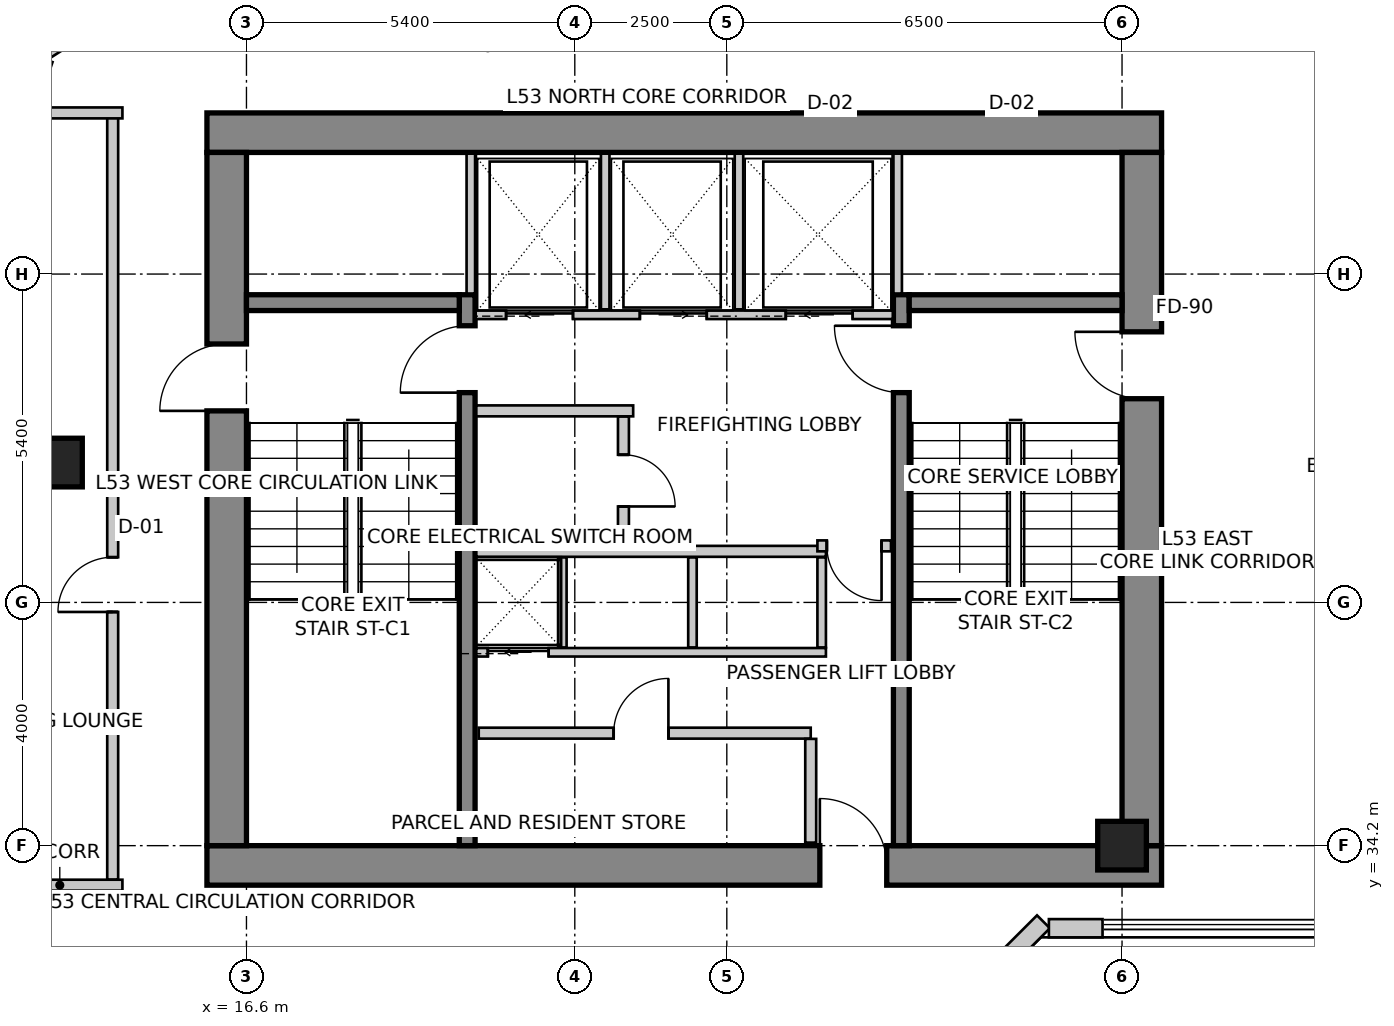
"""IFC4 building model, lengths in metres.
Left out: names, types, materials, properties, quantities, classifications, styles, units other than length and angle.
Written with IfcOpenShell. Run it as: python <this file> out.ifc"""

import sys

from ifc_helpers import new_model, si_unit, direction, frame, frame_2d, origin, origin_2d, place, context, subcontext, project, spatial, rectangle, extrude, source, transform, mapped, element, fill, save


model = new_model("IFC4")
c1 = context("Model", 3, precision=1e-05, world=origin(), true_north=direction((0.0, 1.0)))
c2 = subcontext(c1, "Body", "Model", "MODEL_VIEW")
j1 = project(units=[si_unit("LENGTHUNIT", "METRE"), si_unit("PLANEANGLEUNIT", "RADIAN")], contexts=[c1])
p1 = place(None, origin())
s1 = spatial("IfcSite", under=j1, at=p1, CompositionType="ELEMENT")
p2 = place(p1, origin())
s2 = spatial("IfcBuilding", under=s1, at=p2, CompositionType="ELEMENT")
p3 = place(p2, frame((0.0, 0.0, 211.4)))
s3 = spatial("IfcBuildingStorey", under=s2, at=p3, CompositionType="ELEMENT", Elevation=211.4)
p4 = place(p3, frame((15.95, 45.925, 0.0), z_axis=(0.0, 0.0, 1.0), x_axis=(1.0, 0.0, 0.0)))
e1 = element("IfcWall", 1, at=p4, inside=s3, PredefinedType="SHEAR", context=c2, shape_type="SweptSolid", body=[
    extrude(rectangle(XDim=15.7, YDim=0.65, at=frame_2d((7.85, 0.0))), origin(), (0.0, 0.0, 1.0), 3.5),
])
p5 = place(p3, frame((15.95, 33.875, 0.0), z_axis=(0.0, 0.0, 1.0), x_axis=(1.0, 0.0, 0.0)))
e2 = element("IfcWall", 2, at=p5, inside=s3, PredefinedType="SHEAR", context=c2, shape_type="SweptSolid", body=[
    extrude(rectangle(XDim=15.7, YDim=0.65, at=frame_2d((7.85, 0.0))), origin(), (0.0, 0.0, 1.0), 3.5),
])
m1 = source(origin(), c2, "Body", "SweptSolid", [
    extrude(rectangle(XDim=1.1, YDim=2.15, at=frame_2d((0.55, 1.075))), frame((0.0, 0.335, 0.0), z_axis=(0.0, -1.0, 0.0), x_axis=(1.0, 0.0, 0.0)), (0.0, 0.0, 1.0), 0.67),
])
p6 = place(p5, frame((10.08, 0.0, 0.0)))
e3 = element("IfcOpeningElement", 3, at=p6, cuts=e2, PredefinedType="OPENING", context=c2, shape_type="MappedRepresentation", body=[
    mapped(m1, transform((0.0, 0.0, 0.0), scale=1.0)),
])
p7 = place(p3, frame((16.275, 34.2, 0.0), z_axis=(0.0, 0.0, 1.0), x_axis=(0.0, 1.0, 0.0)))
e4 = element("IfcWall", 4, at=p7, inside=s3, PredefinedType="SHEAR", context=c2, shape_type="SweptSolid", body=[
    extrude(rectangle(XDim=11.4, YDim=0.65, at=frame_2d((5.7, 0.0))), origin(), (0.0, 0.0, 1.0), 3.5),
])
p8 = place(p7, frame((7.15, 0.0, 0.0)))
e5 = element("IfcOpeningElement", 5, at=p8, cuts=e4, PredefinedType="OPENING", context=c2, shape_type="MappedRepresentation", body=[
    mapped(m1, transform((0.0, 0.0, 0.0), scale=1.0)),
])
p9 = place(p3, frame((31.325, 34.2, 0.0), z_axis=(0.0, 0.0, 1.0), x_axis=(0.0, 1.0, 0.0)))
e6 = element("IfcWall", 6, at=p9, inside=s3, PredefinedType="SHEAR", context=c2, shape_type="SweptSolid", body=[
    extrude(rectangle(XDim=11.4, YDim=0.65, at=frame_2d((5.7, 0.0))), origin(), (0.0, 0.0, 1.0), 3.5),
])
p10 = place(p9, frame((7.35, 0.0, 0.0)))
e7 = element("IfcOpeningElement", 7, at=p10, cuts=e6, PredefinedType="OPENING", context=c2, shape_type="MappedRepresentation", body=[
    mapped(m1, transform((0.0, 0.0, 0.0), scale=1.0)),
])
p11 = place(p3, frame((20.23, 34.2, 0.0), z_axis=(0.0, 0.0, 1.0), x_axis=(0.0, 1.0, 0.0)))
e8 = element("IfcWall", 8, at=p11, inside=s3, PredefinedType="SHEAR", context=c2, shape_type="SweptSolid", body=[
    extrude(rectangle(XDim=9.06, YDim=0.26, at=frame_2d((4.53, 0.0))), origin(), (0.0, 0.0, 1.0), 3.5),
])
m2 = source(origin(), c2, "Body", "SweptSolid", [
    extrude(rectangle(XDim=1.1, YDim=2.15, at=frame_2d((0.55, 1.075))), frame((0.0, 0.14, 0.0), z_axis=(0.0, -1.0, 0.0), x_axis=(1.0, 0.0, 0.0)), (0.0, 0.0, 1.0), 0.28),
])
p12 = place(p11, frame((7.45, 0.0, 0.0)))
e9 = element("IfcOpeningElement", 9, at=p12, cuts=e8, PredefinedType="OPENING", context=c2, shape_type="MappedRepresentation", body=[
    mapped(m2, transform((0.0, 0.0, 0.0), scale=1.0)),
])
p13 = place(p3, frame((27.37, 34.2, 0.0), z_axis=(0.0, 0.0, 1.0), x_axis=(0.0, 1.0, 0.0)))
e10 = element("IfcWall", 10, at=p13, inside=s3, PredefinedType="SHEAR", context=c2, shape_type="SweptSolid", body=[
    extrude(rectangle(XDim=9.06, YDim=0.26, at=frame_2d((4.53, 0.0))), origin(), (0.0, 0.0, 1.0), 3.5),
])
p14 = place(p13, frame((7.45, 0.0, 0.0)))
e11 = element("IfcOpeningElement", 11, at=p14, cuts=e10, PredefinedType="OPENING", context=c2, shape_type="MappedRepresentation", body=[
    mapped(m2, transform((0.0, 0.0, 0.0), scale=1.0)),
])
for number, where, z_axis, x_axis in (
    (12, (16.6, 43.13, 0.0), (0.0, 0.0, 1.0), (1.0, 0.0, 0.0)),
    (13, (27.5, 43.13, 0.0), (0.0, 0.0, 1.0), (1.0, 0.0, 0.0)),
):
    element("IfcWall", number, at=place(p3, frame(where, z_axis=z_axis, x_axis=x_axis)), inside=s3, PredefinedType="SHEAR", context=c2, shape_type="SweptSolid", body=[
        extrude(rectangle(XDim=3.5, YDim=0.26, at=frame_2d((1.75, 0.0))), origin(), (0.0, 0.0, 1.0), 3.5),
    ])
m3 = source(origin(), c2, "Body", "SweptSolid", [
    extrude(rectangle(XDim=0.8, YDim=0.8, at=origin_2d()), origin(), (0.0, 0.0, 1.0), 3.5),
])
for number, where, z_axis, x_axis in (
    (14, (13.5, 40.5, 0.0), (0.0, 0.0, 1.0), (1.0, 0.0, 0.0)),
    (15, (31.0, 34.2, 0.0), (0.0, 0.0, 1.0), (1.0, 0.0, 0.0)),
):
    element("IfcColumn", number, at=place(p3, frame(where, z_axis=z_axis, x_axis=x_axis)), inside=s3, PredefinedType="COLUMN", context=c2, shape_type="MappedRepresentation", body=[
        mapped(m3, transform((0.0, 0.0, 0.0), scale=1.0)),
    ])
p15 = place(p3, frame((27.652, 30.892, 0.0), z_axis=(0.0, 0.0, 1.0), x_axis=(0.707106781187, 0.707106781187, 0.0)))
e16 = element("IfcWall", 16, at=p15, inside=s3, PredefinedType="SOLIDWALL", context=c2, shape_type="SweptSolid", body=[
    extrude(rectangle(XDim=2.907, YDim=0.3, at=frame_2d((1.454, 0.0))), origin(), (0.0, 0.0, 1.0), 3.25),
])
p16 = place(p3, frame((29.797, 32.842, 0.0), z_axis=(0.0, 0.0, 1.0), x_axis=(1.0, 0.0, 0.0)))
e17 = element("IfcWall", 17, at=p16, inside=s3, PredefinedType="SOLIDWALL", context=c2, shape_type="SweptSolid", body=[
    extrude(rectangle(XDim=0.882, YDim=0.3, at=frame_2d((0.441, 0.0))), origin(), (0.0, 0.0, 1.0), 3.25),
])
p17 = place(p3, frame((21.874, 52.742, 0.0), z_axis=(0.0, 0.0, 1.0), x_axis=(-0.84365659959, -0.536883173482, 0.0)))
e18 = element("IfcWall", 18, at=p17, inside=s3, PredefinedType="SOLIDWALL", context=c2, shape_type="SweptSolid", body=[
    extrude(rectangle(XDim=10.283, YDim=0.3, at=frame_2d((5.142, 0.0))), origin(), (0.0, 0.0, 1.0), 3.25),
])
m4 = source(origin(), c2, "Body", "SweptSolid", [
    extrude(rectangle(XDim=2.4, YDim=2.2, at=frame_2d((1.2, 1.1))), frame((0.0, 0.16, 0.0), z_axis=(0.0, -1.0, 0.0), x_axis=(1.0, 0.0, 0.0)), (0.0, 0.0, 1.0), 0.32),
])
p18 = place(p17, frame((3.307, 0.0, 0.85)))
e19 = element("IfcOpeningElement", 19, at=p18, cuts=e18, PredefinedType="OPENING", context=c2, shape_type="MappedRepresentation", body=[
    mapped(m4, transform((0.0, 0.0, 0.0), scale=1.0)),
])
p19 = place(p3, frame((13.269, 47.134, 0.0), z_axis=(0.0, 0.0, 1.0), x_axis=(-0.319920776449, -0.947444297464, 0.0)))
e20 = element("IfcWall", 20, at=p19, inside=s3, PredefinedType="SOLIDWALL", context=c2, shape_type="SweptSolid", body=[
    extrude(rectangle(XDim=16.133, YDim=0.3, at=frame_2d((8.067, 0.0))), origin(), (0.0, 0.0, 1.0), 3.25),
])
m5 = source(origin(), c2, "Body", "SweptSolid", [
    extrude(rectangle(XDim=2.1, YDim=2.0, at=frame_2d((1.05, 1.0))), frame((0.0, 0.16, 0.0), z_axis=(0.0, -1.0, 0.0), x_axis=(1.0, 0.0, 0.0)), (0.0, 0.0, 1.0), 0.32),
])
p20 = place(p19, frame((2.513, 0.0, 0.85)))
e21 = element("IfcOpeningElement", 21, at=p20, cuts=e20, PredefinedType="OPENING", context=c2, shape_type="MappedRepresentation", body=[
    mapped(m5, transform((0.0, 0.0, 0.0), scale=1.0)),
])
p21 = place(p19, frame((7.26, 0.0, 0.85)))
e22 = element("IfcOpeningElement", 22, at=p21, cuts=e20, PredefinedType="OPENING", context=c2, shape_type="MappedRepresentation", body=[
    mapped(m4, transform((0.0, 0.0, 0.0), scale=1.0)),
])
p22 = place(p19, frame((12.307, 0.0, 0.85)))
e23 = element("IfcOpeningElement", 23, at=p22, cuts=e20, PredefinedType="OPENING", context=c2, shape_type="MappedRepresentation", body=[
    mapped(m5, transform((0.0, 0.0, 0.0), scale=1.0)),
])
p23 = place(p3, frame((20.37, 42.93, 0.0), z_axis=(0.0, 0.0, 1.0), x_axis=(1.0, 0.0, 0.0)))
e24 = element("IfcWall", 24, at=p23, inside=s3, PredefinedType="SOLIDWALL", context=c2, shape_type="SweptSolid", body=[
    extrude(rectangle(XDim=6.86, YDim=0.14, at=frame_2d((3.43, 0.0))), origin(), (0.0, 0.0, 1.0), 3.25),
])
m6 = source(origin(), c2, "Body", "SweptSolid", [
    extrude(rectangle(XDim=1.1, YDim=2.15, at=frame_2d((0.55, 1.075))), frame((0.0, 0.08, 0.0), z_axis=(0.0, -1.0, 0.0), x_axis=(1.0, 0.0, 0.0)), (0.0, 0.0, 1.0), 0.16),
])
p24 = place(p23, frame((0.5, 0.0, 0.0)))
e25 = element("IfcOpeningElement", 25, at=p24, cuts=e24, PredefinedType="OPENING", context=c2, shape_type="MappedRepresentation", body=[
    mapped(m6, transform((0.0, 0.0, 0.0), scale=1.0)),
])
p25 = place(p23, frame((2.7, 0.0, 0.0)))
e26 = element("IfcOpeningElement", 26, at=p25, cuts=e24, PredefinedType="OPENING", context=c2, shape_type="MappedRepresentation", body=[
    mapped(m6, transform((0.0, 0.0, 0.0), scale=1.0)),
])
p26 = place(p23, frame((5.1, 0.0, 0.0)))
e27 = element("IfcOpeningElement", 27, at=p26, cuts=e24, PredefinedType="OPENING", context=c2, shape_type="MappedRepresentation", body=[
    mapped(m6, transform((0.0, 0.0, 0.0), scale=1.0)),
])
for number, where, z_axis, x_axis in (
    (28, (20.29, 43.28, 0.0), (0.0, 0.0, 1.0), (0.0, 1.0, 0.0)),
    (29, (27.31, 43.28, 0.0), (0.0, 0.0, 1.0), (0.0, 1.0, 0.0)),
):
    element("IfcWall", number, at=place(p3, frame(where, z_axis=z_axis, x_axis=x_axis)), inside=s3, PredefinedType="SOLIDWALL", context=c2, shape_type="SweptSolid", body=[
        extrude(rectangle(XDim=2.3, YDim=0.14, at=frame_2d((1.15, 0.0))), origin(), (0.0, 0.0, 1.0), 3.25),
    ])
for number, where, z_axis, x_axis in (
    (30, (22.5, 43.02, 0.0), (0.0, 0.0, 1.0), (0.0, 1.0, 0.0)),
    (31, (24.7, 43.02, 0.0), (0.0, 0.0, 1.0), (0.0, 1.0, 0.0)),
):
    element("IfcWall", number, at=place(p3, frame(where, z_axis=z_axis, x_axis=x_axis)), inside=s3, PredefinedType="SOLIDWALL", context=c2, shape_type="SweptSolid", body=[
        extrude(rectangle(XDim=2.56, YDim=0.14, at=frame_2d((1.28, 0.0))), origin(), (0.0, 0.0, 1.0), 3.25),
    ])
p27 = place(p3, frame((20.38, 37.38, 0.0), z_axis=(0.0, 0.0, 1.0), x_axis=(1.0, 0.0, 0.0)))
e32 = element("IfcWall", 32, at=p27, inside=s3, PredefinedType="SOLIDWALL", context=c2, shape_type="SweptSolid", body=[
    extrude(rectangle(XDim=5.75, YDim=0.14, at=frame_2d((2.875, 0.0))), origin(), (0.0, 0.0, 1.0), 3.25),
])
m7 = source(origin(), c2, "Body", "SweptSolid", [
    extrude(rectangle(XDim=1.0, YDim=2.15, at=frame_2d((0.5, 1.075))), frame((0.0, 0.08, 0.0), z_axis=(0.0, -1.0, 0.0), x_axis=(1.0, 0.0, 0.0)), (0.0, 0.0, 1.0), 0.16),
])
p28 = place(p27, frame((0.19, 0.0, 0.0)))
e33 = element("IfcOpeningElement", 33, at=p28, cuts=e32, PredefinedType="OPENING", context=c2, shape_type="MappedRepresentation", body=[
    mapped(m7, transform((0.0, 0.0, 0.0), scale=1.0)),
])
p29 = place(p3, frame((20.38, 39.04, 0.0), z_axis=(0.0, 0.0, 1.0), x_axis=(1.0, 0.0, 0.0)))
e34 = element("IfcWall", 34, at=p29, inside=s3, PredefinedType="SOLIDWALL", context=c2, shape_type="SweptSolid", body=[
    extrude(rectangle(XDim=5.75, YDim=0.18, at=frame_2d((2.875, 0.0))), origin(), (0.0, 0.0, 1.0), 3.25),
])
for number, where, z_axis, x_axis in (
    (35, (26.06, 37.46, 0.0), (0.0, 0.0, 1.0), (0.0, 1.0, 0.0)),
    (36, (21.795, 37.46, 0.0), (0.0, 0.0, 1.0), (0.0, 1.0, 0.0)),
    (37, (23.935, 37.46, 0.0), (0.0, 0.0, 1.0), (0.0, 1.0, 0.0)),
):
    element("IfcWall", number, at=place(p3, frame(where, z_axis=z_axis, x_axis=x_axis)), inside=s3, PredefinedType="SOLIDWALL", context=c2, shape_type="SweptSolid", body=[
        extrude(rectangle(XDim=1.48, YDim=0.14, at=frame_2d((0.74, 0.0))), origin(), (0.0, 0.0, 1.0), 3.25),
    ])
p30 = place(p3, frame((22.96, 41.35, 0.0), z_axis=(0.0, 0.0, 1.0), x_axis=(-1.0, 0.0, 0.0)))
e38 = element("IfcWall", 38, at=p30, inside=s3, PredefinedType="PARTITIONING", context=c2, shape_type="SweptSolid", body=[
    extrude(rectangle(XDim=2.58, YDim=0.18, at=frame_2d((1.29, 0.0))), origin(), (0.0, 0.0, 1.0), 3.25),
])
p31 = place(p3, frame((22.8, 41.256, 0.0), z_axis=(0.0, 0.0, 1.0), x_axis=(0.0, -1.0, 0.0)))
e39 = element("IfcWall", 39, at=p31, inside=s3, PredefinedType="PARTITIONING", context=c2, shape_type="SweptSolid", body=[
    extrude(rectangle(XDim=2.106, YDim=0.18, at=frame_2d((1.053, 0.0))), origin(), (0.0, 0.0, 1.0), 3.25),
])
m8 = source(origin(), c2, "Body", "SweptSolid", [
    extrude(rectangle(XDim=0.85, YDim=2.15, at=frame_2d((0.425, 1.075))), frame((0.0, 0.1, 0.0), z_axis=(0.0, -1.0, 0.0), x_axis=(1.0, 0.0, 0.0)), (0.0, 0.0, 1.0), 0.2),
])
p32 = place(p31, frame((0.628, 0.0, 0.0)))
e40 = element("IfcOpeningElement", 40, at=p32, cuts=e39, PredefinedType="OPENING", context=c2, shape_type="MappedRepresentation", body=[
    mapped(m8, transform((0.0, 0.0, 0.0), scale=1.0)),
])
p33 = place(p3, frame((27.2, 39.13, 0.0), z_axis=(0.0, 0.0, 1.0), x_axis=(-1.0, 0.0, 0.0)))
e41 = element("IfcWall", 41, at=p33, inside=s3, PredefinedType="PARTITIONING", context=c2, shape_type="SweptSolid", body=[
    extrude(rectangle(XDim=1.21, YDim=0.18, at=frame_2d((0.605, 0.0))), origin(), (0.0, 0.0, 1.0), 3.25),
])
m9 = source(origin(), c2, "Body", "SweptSolid", [
    extrude(rectangle(XDim=0.9, YDim=2.15, at=frame_2d((0.45, 1.075))), frame((0.0, 0.1, 0.0), z_axis=(0.0, -1.0, 0.0), x_axis=(1.0, 0.0, 0.0)), (0.0, 0.0, 1.0), 0.2),
])
p34 = place(p33, frame((0.155, 0.0, 0.0)))
e42 = element("IfcOpeningElement", 42, at=p34, cuts=e41, PredefinedType="OPENING", context=c2, shape_type="MappedRepresentation", body=[
    mapped(m9, transform((0.0, 0.0, 0.0), scale=1.0)),
])
p35 = place(p3, frame((20.42, 36.05, 0.0), z_axis=(0.0, 0.0, 1.0), x_axis=(1.0, 0.0, 0.0)))
e43 = element("IfcWall", 43, at=p35, inside=s3, PredefinedType="PARTITIONING", context=c2, shape_type="SweptSolid", body=[
    extrude(rectangle(XDim=5.46, YDim=0.18, at=frame_2d((2.73, 0.0))), origin(), (0.0, 0.0, 1.0), 3.25),
])
p36 = place(p35, frame((2.219, 0.0, 0.0)))
e44 = element("IfcOpeningElement", 44, at=p36, cuts=e43, PredefinedType="OPENING", context=c2, shape_type="MappedRepresentation", body=[
    mapped(m9, transform((0.0, 0.0, 0.0), scale=1.0)),
])
p37 = place(p3, frame((25.88, 35.956, 0.0), z_axis=(0.0, 0.0, 1.0), x_axis=(0.0, -1.0, 0.0)))
e45 = element("IfcWall", 45, at=p37, inside=s3, PredefinedType="PARTITIONING", context=c2, shape_type="SweptSolid", body=[
    extrude(rectangle(XDim=1.706, YDim=0.18, at=frame_2d((0.853, 0.0))), origin(), (0.0, 0.0, 1.0), 2.542),
])
p38 = place(p3, frame((12.5, 33.55, 0.0), z_axis=(0.0, 0.0, 1.0), x_axis=(1.0, 0.0, 0.0)))
e46 = element("IfcWall", 46, at=p38, inside=s3, PredefinedType="PARTITIONING", context=c2, shape_type="SweptSolid", body=[
    extrude(rectangle(XDim=2.06, YDim=0.18, at=frame_2d((1.03, 0.0))), origin(), (0.0, 0.0, 1.0), 3.25),
])
p39 = place(p3, frame((14.4, 33.644, 0.0), z_axis=(0.0, 0.0, 1.0), x_axis=(0.0, 1.0, 0.0)))
e47 = element("IfcWall", 47, at=p39, inside=s3, PredefinedType="PARTITIONING", context=c2, shape_type="SweptSolid", body=[
    extrude(rectangle(XDim=12.606, YDim=0.18, at=frame_2d((6.303, 0.0))), origin(), (0.0, 0.0, 1.0), 3.25),
])
p40 = place(p39, frame((4.399, 0.0, 0.0)))
e48 = element("IfcOpeningElement", 48, at=p40, cuts=e47, PredefinedType="OPENING", context=c2, shape_type="MappedRepresentation", body=[
    mapped(m9, transform((0.0, 0.0, 0.0), scale=1.0)),
])
p41 = place(p3, frame((14.56, 46.25, 0.0), z_axis=(0.0, 0.0, 1.0), x_axis=(-1.0, 0.0, 0.0)))
e49 = element("IfcWall", 49, at=p41, inside=s3, PredefinedType="PARTITIONING", context=c2, shape_type="SweptSolid", body=[
    extrude(rectangle(XDim=1.469, YDim=0.18, at=frame_2d((0.734, 0.0))), origin(), (0.0, 0.0, 1.0), 3.25),
])
m10 = source(origin(), c2, "Body", "SweptSolid", [
    extrude(rectangle(XDim=1.1, YDim=2.15, at=frame_2d((0.55, 1.075))), frame((0.0, 0.025, 0.0), z_axis=(0.0, -1.0, 0.0), x_axis=(1.0, 0.0, 0.0)), (0.0, 0.0, 1.0), 0.05),
])
p42 = place(p24, origin())
e50 = element("IfcDoor", 50, at=p42, inside=s3, OperationType="SLIDING_TO_LEFT", PredefinedType="DOOR", context=c2, shape_type="MappedRepresentation", body=[
    mapped(m10, transform((0.0, 0.0, 0.0), scale=1.0)),
])
fill(e25, e50)
p43 = place(p25, origin())
e51 = element("IfcDoor", 51, at=p43, inside=s3, OperationType="SLIDING_TO_RIGHT", PredefinedType="DOOR", context=c2, shape_type="MappedRepresentation", body=[
    mapped(m10, transform((0.0, 0.0, 0.0), scale=1.0)),
])
fill(e26, e51)
m11 = source(origin(), c2, "Body", "SweptSolid", [
    extrude(rectangle(XDim=1.1, YDim=2.15, at=frame_2d((0.55, 1.075))), frame((0.0, 0.025, 0.0), z_axis=(0.0, -1.0, 0.0), x_axis=(1.0, 0.0, 0.0)), (0.0, 0.0, 1.0), 0.05),
])
p44 = place(p26, origin())
e52 = element("IfcDoor", 52, at=p44, inside=s3, OperationType="SLIDING_TO_LEFT", PredefinedType="DOOR", context=c2, shape_type="MappedRepresentation", body=[
    mapped(m11, transform((0.0, 0.0, 0.0), scale=1.0)),
])
fill(e27, e52)
m12 = source(origin(), c2, "Body", "SweptSolid", [
    extrude(rectangle(XDim=1.0, YDim=2.15, at=frame_2d((0.5, 1.075))), frame((0.0, 0.025, 0.0), z_axis=(0.0, -1.0, 0.0), x_axis=(1.0, 0.0, 0.0)), (0.0, 0.0, 1.0), 0.05),
])
p45 = place(p28, origin())
e53 = element("IfcDoor", 53, at=p45, inside=s3, OperationType="SLIDING_TO_LEFT", PredefinedType="DOOR", context=c2, shape_type="MappedRepresentation", body=[
    mapped(m12, transform((0.0, 0.0, 0.0), scale=1.0)),
])
fill(e33, e53)
m13 = source(origin(), c2, "Body", "SweptSolid", [
    extrude(rectangle(XDim=1.1, YDim=2.15, at=frame_2d((0.55, 1.075))), frame((0.0, 0.025, 0.0), z_axis=(0.0, -1.0, 0.0), x_axis=(1.0, 0.0, 0.0)), (0.0, 0.0, 1.0), 0.05),
])
p46 = place(p12, origin())
e54 = element("IfcDoor", 54, at=p46, inside=s3, OperationType="SINGLE_SWING_LEFT", PredefinedType="DOOR", context=c2, shape_type="MappedRepresentation", body=[
    mapped(m13, transform((0.0, 0.0, 0.0), scale=1.0)),
])
fill(e9, e54)
p47 = place(p14, origin())
e55 = element("IfcDoor", 55, at=p47, inside=s3, OperationType="SINGLE_SWING_RIGHT", PredefinedType="DOOR", context=c2, shape_type="MappedRepresentation", body=[
    mapped(m13, transform((0.0, 0.0, 0.0), scale=1.0)),
])
fill(e11, e55)
p48 = place(p8, origin())
e56 = element("IfcDoor", 56, at=p48, inside=s3, OperationType="SINGLE_SWING_LEFT", PredefinedType="DOOR", context=c2, shape_type="MappedRepresentation", body=[
    mapped(m13, transform((0.0, 0.0, 0.0), scale=1.0)),
])
fill(e5, e56)
p49 = place(p10, origin())
e57 = element("IfcDoor", 57, at=p49, inside=s3, OperationType="SINGLE_SWING_RIGHT", PredefinedType="DOOR", context=c2, shape_type="MappedRepresentation", body=[
    mapped(m13, transform((0.0, 0.0, 0.0), scale=1.0)),
])
fill(e7, e57)
p50 = place(p6, origin())
e58 = element("IfcDoor", 58, at=p50, inside=s3, OperationType="SINGLE_SWING_LEFT", PredefinedType="DOOR", context=c2, shape_type="MappedRepresentation", body=[
    mapped(m13, transform((0.0, 0.0, 0.0), scale=1.0)),
])
fill(e3, e58)
m14 = source(origin(), c2, "Body", "SweptSolid", [
    extrude(rectangle(XDim=0.85, YDim=2.15, at=frame_2d((0.425, 1.075))), frame((0.0, 0.025, 0.0), z_axis=(0.0, -1.0, 0.0), x_axis=(1.0, 0.0, 0.0)), (0.0, 0.0, 1.0), 0.05),
])
p51 = place(p32, origin())
e59 = element("IfcDoor", 59, at=p51, inside=s3, OperationType="SINGLE_SWING_RIGHT", PredefinedType="DOOR", context=c2, shape_type="MappedRepresentation", body=[
    mapped(m14, transform((0.0, 0.0, 0.0), scale=1.0)),
])
fill(e40, e59)
m15 = source(origin(), c2, "Body", "SweptSolid", [
    extrude(rectangle(XDim=0.9, YDim=2.15, at=frame_2d((0.45, 1.075))), frame((0.0, 0.025, 0.0), z_axis=(0.0, -1.0, 0.0), x_axis=(1.0, 0.0, 0.0)), (0.0, 0.0, 1.0), 0.05),
])
p52 = place(p34, origin())
e60 = element("IfcDoor", 60, at=p52, inside=s3, OperationType="SINGLE_SWING_LEFT", PredefinedType="DOOR", context=c2, shape_type="MappedRepresentation", body=[
    mapped(m15, transform((0.0, 0.0, 0.0), scale=1.0)),
])
fill(e42, e60)
p53 = place(p36, origin())
e61 = element("IfcDoor", 61, at=p53, inside=s3, OperationType="SINGLE_SWING_RIGHT", PredefinedType="DOOR", context=c2, shape_type="MappedRepresentation", body=[
    mapped(m15, transform((0.0, 0.0, 0.0), scale=1.0)),
])
fill(e44, e61)
m16 = source(origin(), c2, "Body", "SweptSolid", [
    extrude(rectangle(XDim=0.9, YDim=2.15, at=frame_2d((0.45, 1.075))), frame((0.0, 0.025, 0.0), z_axis=(0.0, -1.0, 0.0), x_axis=(1.0, 0.0, 0.0)), (0.0, 0.0, 1.0), 0.05),
])
p54 = place(p40, origin())
e62 = element("IfcDoor", 62, at=p54, inside=s3, OperationType="SINGLE_SWING_LEFT", PredefinedType="DOOR", context=c2, shape_type="MappedRepresentation", body=[
    mapped(m16, transform((0.0, 0.0, 0.0), scale=1.0)),
])
fill(e48, e62)
save(model, sys.argv[1])
